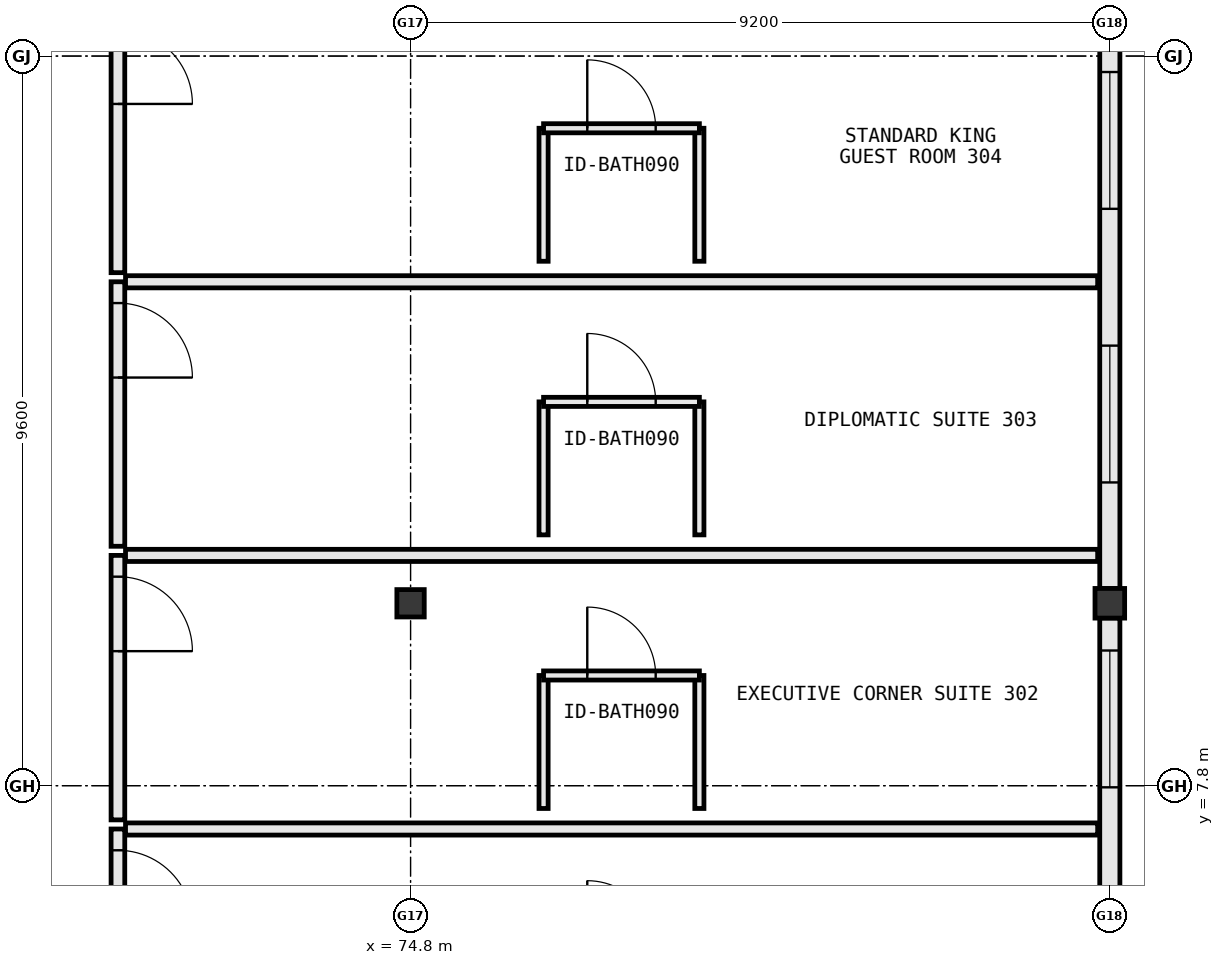
"""IFC4 building model, lengths in metres.
Left out: names, types, materials, properties, quantities, classifications, styles, units other than length and angle.
Written with IfcOpenShell. Run it as: python <this file> out.ifc"""

import sys

from ifc_helpers import new_model, si_unit, direction, frame, frame_2d, origin, origin_2d, place, context, subcontext, project, spatial, rectangle, extrude, element, fill, save


model = new_model("IFC4")
c1 = context("Model", 3, precision=1e-05, world=origin(), true_north=direction((0.0, 1.0)))
c2 = subcontext(c1, "Body", "Model", "MODEL_VIEW")
j1 = project(units=[si_unit("LENGTHUNIT", "METRE"), si_unit("PLANEANGLEUNIT", "RADIAN")], contexts=[c1])
p1 = place(None, origin())
s1 = spatial("IfcSite", under=j1, at=p1, CompositionType="ELEMENT")
p2 = place(p1, origin())
s2 = spatial("IfcBuilding", under=s1, at=p2, CompositionType="ELEMENT")
p3 = place(p2, frame((0.0, 0.0, 46.6)))
s3 = spatial("IfcBuildingStorey", under=s2, at=p3, CompositionType="ELEMENT", Elevation=46.6)
p4 = place(p3, frame((74.8, 10.2, 0.0), z_axis=(0.0, 0.0, 1.0), x_axis=(1.0, 0.0, 0.0)))
e1 = element("IfcColumn", 1, at=p4, inside=s3, PredefinedType="COLUMN", context=c2, shape_type="SweptSolid", body=[
    extrude(rectangle(XDim=0.36, YDim=0.36, at=origin_2d()), origin(), (0.0, 0.0, 1.0), 4.2),
])
p5 = place(p3, frame((84.0, 10.2, 0.0), z_axis=(0.0, 0.0, 1.0), x_axis=(1.0, 0.0, 0.0)))
e2 = element("IfcColumn", 2, at=p5, inside=s3, PredefinedType="COLUMN", context=c2, shape_type="SweptSolid", body=[
    extrude(rectangle(XDim=0.39, YDim=0.39, at=origin_2d()), origin(), (0.0, 0.0, 1.0), 4.2),
])
p6 = place(p3, frame((84.0, 0.793, 0.0), z_axis=(0.0, 0.0, 1.0), x_axis=(0.0, 1.0, 0.0)))
e3 = element("IfcWall", 3, at=p6, inside=s3, PredefinedType="STANDARD", context=c2, shape_type="SweptSolid", body=[
    extrude(rectangle(XDim=9.214, YDim=0.265, at=frame_2d((4.607, 0.0))), origin(), (0.0, 0.0, 1.0), 3.99),
])
p7 = place(p6, frame((0.519, 0.0, 0.85)))
e4 = element("IfcOpeningElement", 4, at=p7, cuts=e3, PredefinedType="OPENING", context=c2, shape_type="SweptSolid", body=[
    extrude(rectangle(XDim=1.8, YDim=1.85, at=frame_2d((0.9, 0.925))), frame((0.0, 0.145, 0.0), z_axis=(0.0, -1.0, 0.0), x_axis=(1.0, 0.0, 0.0)), (0.0, 0.0, 1.0), 0.289),
])
p8 = place(p6, frame((3.797, 0.0, 0.85)))
e5 = element("IfcOpeningElement", 5, at=p8, cuts=e3, PredefinedType="OPENING", context=c2, shape_type="SweptSolid", body=[
    extrude(rectangle(XDim=1.8, YDim=1.85, at=frame_2d((0.9, 0.925))), frame((0.0, 0.145, 0.0), z_axis=(0.0, -1.0, 0.0), x_axis=(1.0, 0.0, 0.0)), (0.0, 0.0, 1.0), 0.289),
])
p9 = place(p6, frame((6.986, 0.0, 0.85)))
e6 = element("IfcOpeningElement", 6, at=p9, cuts=e3, PredefinedType="OPENING", context=c2, shape_type="SweptSolid", body=[
    extrude(rectangle(XDim=1.8, YDim=1.85, at=frame_2d((0.9, 0.925))), frame((0.0, 0.145, 0.0), z_axis=(0.0, -1.0, 0.0), x_axis=(1.0, 0.0, 0.0)), (0.0, 0.0, 1.0), 0.289),
])
p10 = place(p3, frame((84.0, 10.393, 0.0), z_axis=(0.0, 0.0, 1.0), x_axis=(0.0, 1.0, 0.0)))
e7 = element("IfcWall", 7, at=p10, inside=s3, PredefinedType="STANDARD", context=c2, shape_type="SweptSolid", body=[
    extrude(rectangle(XDim=8.014, YDim=0.265, at=frame_2d((4.007, 0.0))), origin(), (0.0, 0.0, 1.0), 3.99),
])
p11 = place(p10, frame((1.397, 0.0, 0.85)))
e8 = element("IfcOpeningElement", 8, at=p11, cuts=e7, PredefinedType="OPENING", context=c2, shape_type="SweptSolid", body=[
    extrude(rectangle(XDim=1.8, YDim=1.85, at=frame_2d((0.9, 0.925))), frame((0.0, 0.145, 0.0), z_axis=(0.0, -1.0, 0.0), x_axis=(1.0, 0.0, 0.0)), (0.0, 0.0, 1.0), 0.289),
])
p12 = place(p10, frame((4.997, 0.0, 0.85)))
e9 = element("IfcOpeningElement", 9, at=p12, cuts=e7, PredefinedType="OPENING", context=c2, shape_type="SweptSolid", body=[
    extrude(rectangle(XDim=1.8, YDim=1.85, at=frame_2d((0.9, 0.925))), frame((0.0, 0.145, 0.0), z_axis=(0.0, -1.0, 0.0), x_axis=(1.0, 0.0, 0.0)), (0.0, 0.0, 1.0), 0.289),
])
p13 = place(p3, frame((70.95, 7.23, 0.0), z_axis=(0.0, 0.0, 1.0), x_axis=(0.0, -1.0, 0.0)))
e10 = element("IfcWall", 10, at=p13, inside=s3, PredefinedType="PARTITIONING", context=c2, shape_type="SweptSolid", body=[
    extrude(rectangle(XDim=3.48, YDim=0.18, at=frame_2d((1.74, 0.0))), origin(), (0.0, 0.0, 1.0), 3.99),
])
p14 = place(p13, frame((0.28, 0.0, 0.0)))
e11 = element("IfcOpeningElement", 11, at=p14, cuts=e10, PredefinedType="OPENING", context=c2, shape_type="SweptSolid", body=[
    extrude(rectangle(XDim=0.98, YDim=2.18, at=frame_2d((0.49, 1.09))), frame((0.0, 0.102, 0.0), z_axis=(0.0, -1.0, 0.0), x_axis=(1.0, 0.0, 0.0)), (0.0, 0.0, 1.0), 0.204),
])
p15 = place(p3, frame((71.05, 7.23, 0.0), z_axis=(0.0, 0.0, 1.0), x_axis=(1.0, 0.0, 0.0)))
e12 = element("IfcWall", 12, at=p15, inside=s3, PredefinedType="PARTITIONING", context=c2, shape_type="SweptSolid", body=[
    extrude(rectangle(XDim=12.79, YDim=0.16, at=frame_2d((6.395, 0.0))), origin(), (0.0, 0.0, 1.0), 3.99),
])
p16 = place(p3, frame((70.95, 10.83, 0.0), z_axis=(0.0, 0.0, 1.0), x_axis=(0.0, -1.0, 0.0)))
e13 = element("IfcWall", 13, at=p16, inside=s3, PredefinedType="PARTITIONING", context=c2, shape_type="SweptSolid", body=[
    extrude(rectangle(XDim=3.48, YDim=0.18, at=frame_2d((1.74, 0.0))), origin(), (0.0, 0.0, 1.0), 3.99),
])
p17 = place(p16, frame((0.28, 0.0, 0.0)))
e14 = element("IfcOpeningElement", 14, at=p17, cuts=e13, PredefinedType="OPENING", context=c2, shape_type="SweptSolid", body=[
    extrude(rectangle(XDim=0.98, YDim=2.18, at=frame_2d((0.49, 1.09))), frame((0.0, 0.102, 0.0), z_axis=(0.0, -1.0, 0.0), x_axis=(1.0, 0.0, 0.0)), (0.0, 0.0, 1.0), 0.204),
])
p18 = place(p3, frame((71.05, 10.83, 0.0), z_axis=(0.0, 0.0, 1.0), x_axis=(1.0, 0.0, 0.0)))
e15 = element("IfcWall", 15, at=p18, inside=s3, PredefinedType="PARTITIONING", context=c2, shape_type="SweptSolid", body=[
    extrude(rectangle(XDim=12.79, YDim=0.16, at=frame_2d((6.395, 0.0))), origin(), (0.0, 0.0, 1.0), 3.99),
])
for number, where, z_axis, x_axis in (
    (16, (76.55, 7.5, 0.0), (0.0, 0.0, 1.0), (0.0, 1.0, 0.0)),
    (17, (78.6, 7.5, 0.0), (0.0, 0.0, 1.0), (0.0, 1.0, 0.0)),
):
    element("IfcWall", number, at=place(p3, frame(where, z_axis=z_axis, x_axis=x_axis)), inside=s3, PredefinedType="PARTITIONING", context=c2, shape_type="SweptSolid", body=[
        extrude(rectangle(XDim=1.75, YDim=0.12, at=frame_2d((0.875, 0.0))), origin(), (0.0, 0.0, 1.0), 3.99),
    ])
p19 = place(p3, frame((76.55, 9.25, 0.0), z_axis=(0.0, 0.0, 1.0), x_axis=(1.0, 0.0, 0.0)))
e18 = element("IfcWall", 18, at=p19, inside=s3, PredefinedType="PARTITIONING", context=c2, shape_type="SweptSolid", body=[
    extrude(rectangle(XDim=2.05, YDim=0.12, at=frame_2d((1.025, 0.0))), origin(), (0.0, 0.0, 1.0), 3.99),
])
p20 = place(p19, frame((0.575, 0.0, 0.0)))
e19 = element("IfcOpeningElement", 19, at=p20, cuts=e18, PredefinedType="OPENING", context=c2, shape_type="SweptSolid", body=[
    extrude(rectangle(XDim=0.9, YDim=2.15, at=frame_2d((0.45, 1.075))), frame((0.0, 0.072, 0.0), z_axis=(0.0, -1.0, 0.0), x_axis=(1.0, 0.0, 0.0)), (0.0, 0.0, 1.0), 0.144),
])
p21 = place(p3, frame((70.95, 14.43, 0.0), z_axis=(0.0, 0.0, 1.0), x_axis=(0.0, -1.0, 0.0)))
e20 = element("IfcWall", 20, at=p21, inside=s3, PredefinedType="PARTITIONING", context=c2, shape_type="SweptSolid", body=[
    extrude(rectangle(XDim=3.48, YDim=0.18, at=frame_2d((1.74, 0.0))), origin(), (0.0, 0.0, 1.0), 3.99),
])
p22 = place(p21, frame((0.28, 0.0, 0.0)))
e21 = element("IfcOpeningElement", 21, at=p22, cuts=e20, PredefinedType="OPENING", context=c2, shape_type="SweptSolid", body=[
    extrude(rectangle(XDim=0.98, YDim=2.18, at=frame_2d((0.49, 1.09))), frame((0.0, 0.102, 0.0), z_axis=(0.0, -1.0, 0.0), x_axis=(1.0, 0.0, 0.0)), (0.0, 0.0, 1.0), 0.204),
])
p23 = place(p3, frame((71.05, 14.43, 0.0), z_axis=(0.0, 0.0, 1.0), x_axis=(1.0, 0.0, 0.0)))
e22 = element("IfcWall", 22, at=p23, inside=s3, PredefinedType="PARTITIONING", context=c2, shape_type="SweptSolid", body=[
    extrude(rectangle(XDim=12.79, YDim=0.16, at=frame_2d((6.395, 0.0))), origin(), (0.0, 0.0, 1.0), 3.99),
])
for number, where, z_axis, x_axis in (
    (23, (76.55, 11.1, 0.0), (0.0, 0.0, 1.0), (0.0, 1.0, 0.0)),
    (24, (78.6, 11.1, 0.0), (0.0, 0.0, 1.0), (0.0, 1.0, 0.0)),
):
    element("IfcWall", number, at=place(p3, frame(where, z_axis=z_axis, x_axis=x_axis)), inside=s3, PredefinedType="PARTITIONING", context=c2, shape_type="SweptSolid", body=[
        extrude(rectangle(XDim=1.75, YDim=0.12, at=frame_2d((0.875, 0.0))), origin(), (0.0, 0.0, 1.0), 3.99),
    ])
p24 = place(p3, frame((76.55, 12.85, 0.0), z_axis=(0.0, 0.0, 1.0), x_axis=(1.0, 0.0, 0.0)))
e25 = element("IfcWall", 25, at=p24, inside=s3, PredefinedType="PARTITIONING", context=c2, shape_type="SweptSolid", body=[
    extrude(rectangle(XDim=2.05, YDim=0.12, at=frame_2d((1.025, 0.0))), origin(), (0.0, 0.0, 1.0), 3.99),
])
p25 = place(p24, frame((0.575, 0.0, 0.0)))
e26 = element("IfcOpeningElement", 26, at=p25, cuts=e25, PredefinedType="OPENING", context=c2, shape_type="SweptSolid", body=[
    extrude(rectangle(XDim=0.9, YDim=2.15, at=frame_2d((0.45, 1.075))), frame((0.0, 0.072, 0.0), z_axis=(0.0, -1.0, 0.0), x_axis=(1.0, 0.0, 0.0)), (0.0, 0.0, 1.0), 0.144),
])
p26 = place(p3, frame((70.95, 18.03, 0.0), z_axis=(0.0, 0.0, 1.0), x_axis=(0.0, -1.0, 0.0)))
e27 = element("IfcWall", 27, at=p26, inside=s3, PredefinedType="PARTITIONING", context=c2, shape_type="SweptSolid", body=[
    extrude(rectangle(XDim=3.48, YDim=0.18, at=frame_2d((1.74, 0.0))), origin(), (0.0, 0.0, 1.0), 3.99),
])
p27 = place(p26, frame((0.28, 0.0, 0.0)))
e28 = element("IfcOpeningElement", 28, at=p27, cuts=e27, PredefinedType="OPENING", context=c2, shape_type="SweptSolid", body=[
    extrude(rectangle(XDim=0.98, YDim=2.18, at=frame_2d((0.49, 1.09))), frame((0.0, 0.102, 0.0), z_axis=(0.0, -1.0, 0.0), x_axis=(1.0, 0.0, 0.0)), (0.0, 0.0, 1.0), 0.204),
])
for number, where, z_axis, x_axis in (
    (29, (76.55, 14.7, 0.0), (0.0, 0.0, 1.0), (0.0, 1.0, 0.0)),
    (30, (78.6, 14.7, 0.0), (0.0, 0.0, 1.0), (0.0, 1.0, 0.0)),
):
    element("IfcWall", number, at=place(p3, frame(where, z_axis=z_axis, x_axis=x_axis)), inside=s3, PredefinedType="PARTITIONING", context=c2, shape_type="SweptSolid", body=[
        extrude(rectangle(XDim=1.75, YDim=0.12, at=frame_2d((0.875, 0.0))), origin(), (0.0, 0.0, 1.0), 3.99),
    ])
p28 = place(p3, frame((76.55, 16.45, 0.0), z_axis=(0.0, 0.0, 1.0), x_axis=(1.0, 0.0, 0.0)))
e31 = element("IfcWall", 31, at=p28, inside=s3, PredefinedType="PARTITIONING", context=c2, shape_type="SweptSolid", body=[
    extrude(rectangle(XDim=2.05, YDim=0.12, at=frame_2d((1.025, 0.0))), origin(), (0.0, 0.0, 1.0), 3.99),
])
p29 = place(p28, frame((0.575, 0.0, 0.0)))
e32 = element("IfcOpeningElement", 32, at=p29, cuts=e31, PredefinedType="OPENING", context=c2, shape_type="SweptSolid", body=[
    extrude(rectangle(XDim=0.9, YDim=2.15, at=frame_2d((0.45, 1.075))), frame((0.0, 0.072, 0.0), z_axis=(0.0, -1.0, 0.0), x_axis=(1.0, 0.0, 0.0)), (0.0, 0.0, 1.0), 0.144),
])
p30 = place(p9, origin())
e33 = element("IfcWindow", 33, at=p30, inside=s3, PartitioningType="SINGLE_PANEL", PredefinedType="WINDOW", context=c2, shape_type="SweptSolid", body=[
    extrude(rectangle(XDim=1.8, YDim=1.85, at=frame_2d((0.9, 0.925))), frame((0.0, 0.03, 0.0), z_axis=(0.0, -1.0, 0.0), x_axis=(1.0, 0.0, 0.0)), (0.0, 0.0, 1.0), 0.06),
])
fill(e6, e33)
p31 = place(p11, origin())
e34 = element("IfcWindow", 34, at=p31, inside=s3, PartitioningType="SINGLE_PANEL", PredefinedType="WINDOW", context=c2, shape_type="SweptSolid", body=[
    extrude(rectangle(XDim=1.8, YDim=1.85, at=frame_2d((0.9, 0.925))), frame((0.0, 0.03, 0.0), z_axis=(0.0, -1.0, 0.0), x_axis=(1.0, 0.0, 0.0)), (0.0, 0.0, 1.0), 0.06),
])
fill(e8, e34)
p32 = place(p12, origin())
e35 = element("IfcWindow", 35, at=p32, inside=s3, PartitioningType="SINGLE_PANEL", PredefinedType="WINDOW", context=c2, shape_type="SweptSolid", body=[
    extrude(rectangle(XDim=1.8, YDim=1.85, at=frame_2d((0.9, 0.925))), frame((0.0, 0.03, 0.0), z_axis=(0.0, -1.0, 0.0), x_axis=(1.0, 0.0, 0.0)), (0.0, 0.0, 1.0), 0.06),
])
fill(e9, e35)
p33 = place(p14, origin())
e36 = element("IfcDoor", 36, at=p33, inside=s3, OperationType="SINGLE_SWING_RIGHT", PredefinedType="DOOR", context=c2, shape_type="SweptSolid", body=[
    extrude(rectangle(XDim=0.98, YDim=2.18, at=frame_2d((0.49, 1.09))), frame((0.0, 0.025, 0.0), z_axis=(0.0, -1.0, 0.0), x_axis=(1.0, 0.0, 0.0)), (0.0, 0.0, 1.0), 0.05),
])
fill(e11, e36)
p34 = place(p17, origin())
e37 = element("IfcDoor", 37, at=p34, inside=s3, OperationType="SINGLE_SWING_RIGHT", PredefinedType="DOOR", context=c2, shape_type="SweptSolid", body=[
    extrude(rectangle(XDim=0.98, YDim=2.18, at=frame_2d((0.49, 1.09))), frame((0.0, 0.025, 0.0), z_axis=(0.0, -1.0, 0.0), x_axis=(1.0, 0.0, 0.0)), (0.0, 0.0, 1.0), 0.05),
])
fill(e14, e37)
p35 = place(p20, origin())
e38 = element("IfcDoor", 38, at=p35, inside=s3, OperationType="SINGLE_SWING_LEFT", PredefinedType="DOOR", context=c2, shape_type="SweptSolid", body=[
    extrude(rectangle(XDim=0.9, YDim=2.15, at=frame_2d((0.45, 1.075))), frame((0.0, 0.025, 0.0), z_axis=(0.0, -1.0, 0.0), x_axis=(1.0, 0.0, 0.0)), (0.0, 0.0, 1.0), 0.05),
])
fill(e19, e38)
p36 = place(p22, origin())
e39 = element("IfcDoor", 39, at=p36, inside=s3, OperationType="SINGLE_SWING_RIGHT", PredefinedType="DOOR", context=c2, shape_type="SweptSolid", body=[
    extrude(rectangle(XDim=0.98, YDim=2.18, at=frame_2d((0.49, 1.09))), frame((0.0, 0.025, 0.0), z_axis=(0.0, -1.0, 0.0), x_axis=(1.0, 0.0, 0.0)), (0.0, 0.0, 1.0), 0.05),
])
fill(e21, e39)
p37 = place(p25, origin())
e40 = element("IfcDoor", 40, at=p37, inside=s3, OperationType="SINGLE_SWING_LEFT", PredefinedType="DOOR", context=c2, shape_type="SweptSolid", body=[
    extrude(rectangle(XDim=0.9, YDim=2.15, at=frame_2d((0.45, 1.075))), frame((0.0, 0.025, 0.0), z_axis=(0.0, -1.0, 0.0), x_axis=(1.0, 0.0, 0.0)), (0.0, 0.0, 1.0), 0.05),
])
fill(e26, e40)
p38 = place(p27, origin())
e41 = element("IfcDoor", 41, at=p38, inside=s3, OperationType="SINGLE_SWING_RIGHT", PredefinedType="DOOR", context=c2, shape_type="SweptSolid", body=[
    extrude(rectangle(XDim=0.98, YDim=2.18, at=frame_2d((0.49, 1.09))), frame((0.0, 0.025, 0.0), z_axis=(0.0, -1.0, 0.0), x_axis=(1.0, 0.0, 0.0)), (0.0, 0.0, 1.0), 0.05),
])
fill(e28, e41)
p39 = place(p29, origin())
e42 = element("IfcDoor", 42, at=p39, inside=s3, OperationType="SINGLE_SWING_LEFT", PredefinedType="DOOR", context=c2, shape_type="SweptSolid", body=[
    extrude(rectangle(XDim=0.9, YDim=2.15, at=frame_2d((0.45, 1.075))), frame((0.0, 0.025, 0.0), z_axis=(0.0, -1.0, 0.0), x_axis=(1.0, 0.0, 0.0)), (0.0, 0.0, 1.0), 0.05),
])
fill(e32, e42)
save(model, sys.argv[1])
